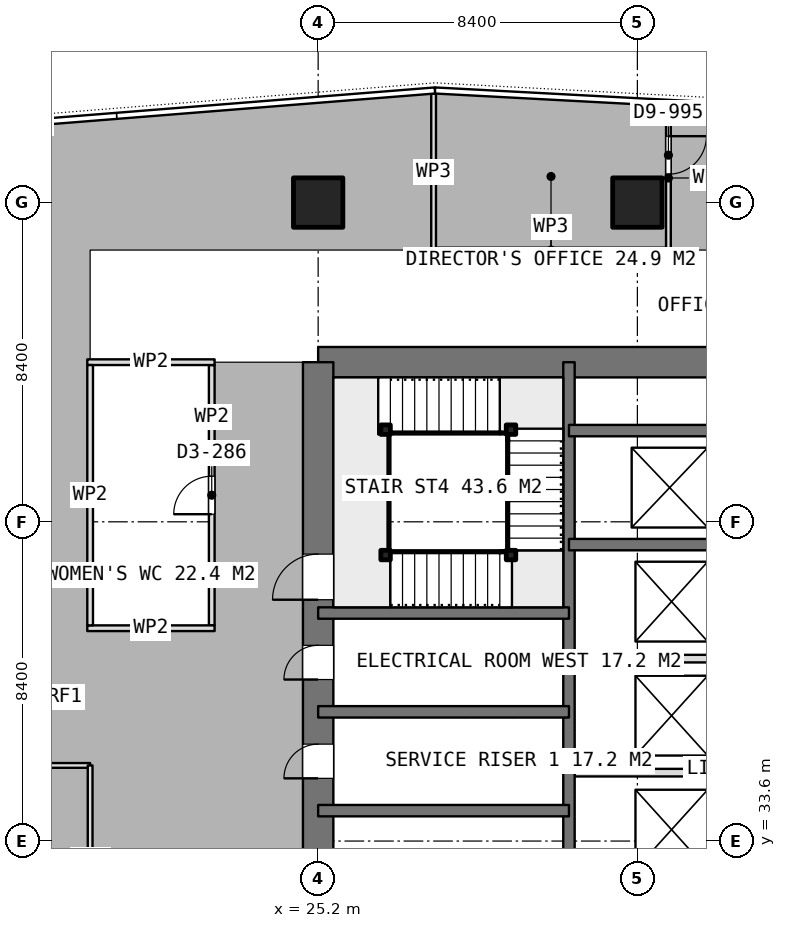
"""IFC4 building model, lengths in metres.
Left out: names, types, materials, properties, quantities, classifications, styles, units other than length and angle.
Written with IfcOpenShell. Run it as: python <this file> out.ifc"""

import sys

from ifc_helpers import new_model, si_unit, direction, frame, frame_2d, origin, origin_2d, place, context, subcontext, project, spatial, rectangle, extrude, element, fill, save


model = new_model("IFC4")
c1 = context("Model", 3, precision=1e-05, world=origin(), true_north=direction((0.0, 1.0)))
c2 = subcontext(c1, "Body", "Model", "MODEL_VIEW")
j1 = project(units=[si_unit("LENGTHUNIT", "METRE"), si_unit("PLANEANGLEUNIT", "RADIAN")], contexts=[c1])
p1 = place(None, origin())
s1 = spatial("IfcSite", under=j1, at=p1, CompositionType="ELEMENT")
p2 = place(p1, origin())
s2 = spatial("IfcBuilding", under=s1, at=p2, CompositionType="ELEMENT")
p3 = place(p2, frame((0.0, 0.0, 265.1)))
s3 = spatial("IfcBuildingStorey", under=s2, at=p3, CompositionType="ELEMENT", Elevation=265.1)
p4 = place(p3, frame((25.2, 46.2, 0.0), z_axis=(0.0, 0.0, 1.0), x_axis=(1.0, 0.0, 0.0)))
e1 = element("IfcWall", 1, at=p4, inside=s3, PredefinedType="SHEAR", context=c2, shape_type="SweptSolid", body=[
    extrude(rectangle(XDim=10.4, YDim=0.8, at=frame_2d((5.2, 0.0))), origin(), (0.0, 0.0, 1.0), 3.75),
])
p5 = place(p3, frame((25.2, 21.0, 0.0), z_axis=(0.0, 0.0, 1.0), x_axis=(0.0, 1.0, 0.0)))
e2 = element("IfcWall", 2, at=p5, inside=s3, PredefinedType="SHEAR", context=c2, shape_type="SweptSolid", body=[
    extrude(rectangle(XDim=25.2, YDim=0.8, at=frame_2d((12.6, 0.0))), origin(), (0.0, 0.0, 1.0), 3.75),
])
p6 = place(p5, frame((7.8, 0.0, 0.0)))
e3 = element("IfcOpeningElement", 3, at=p6, cuts=e2, PredefinedType="OPENING", context=c2, shape_type="SweptSolid", body=[
    extrude(rectangle(XDim=1.2, YDim=2.1, at=frame_2d((0.6, 1.05))), frame((0.0, 0.41, 0.0), z_axis=(0.0, -1.0, 0.0), x_axis=(1.0, 0.0, 0.0)), (0.0, 0.0, 1.0), 0.82),
])
p7 = place(p5, frame((14.25, 0.0, 0.0)))
e4 = element("IfcOpeningElement", 4, at=p7, cuts=e2, PredefinedType="OPENING", context=c2, shape_type="SweptSolid", body=[
    extrude(rectangle(XDim=0.9, YDim=2.1, at=frame_2d((0.45, 1.05))), frame((0.0, 0.41, 0.0), z_axis=(0.0, -1.0, 0.0), x_axis=(1.0, 0.0, 0.0)), (0.0, 0.0, 1.0), 0.82),
])
p8 = place(p5, frame((16.85, 0.0, 0.0)))
e5 = element("IfcOpeningElement", 5, at=p8, cuts=e2, PredefinedType="OPENING", context=c2, shape_type="SweptSolid", body=[
    extrude(rectangle(XDim=0.9, YDim=2.1, at=frame_2d((0.45, 1.05))), frame((0.0, 0.41, 0.0), z_axis=(0.0, -1.0, 0.0), x_axis=(1.0, 0.0, 0.0)), (0.0, 0.0, 1.0), 0.82),
])
p9 = place(p5, frame((18.95, 0.0, 0.0)))
e6 = element("IfcOpeningElement", 6, at=p9, cuts=e2, PredefinedType="OPENING", context=c2, shape_type="SweptSolid", body=[
    extrude(rectangle(XDim=1.2, YDim=2.1, at=frame_2d((0.6, 1.05))), frame((0.0, 0.41, 0.0), z_axis=(0.0, -1.0, 0.0), x_axis=(1.0, 0.0, 0.0)), (0.0, 0.0, 1.0), 0.82),
])
p10 = place(p3, frame((31.8, 21.0, 0.0), z_axis=(0.0, 0.0, 1.0), x_axis=(0.0, 1.0, 0.0)))
e7 = element("IfcWall", 7, at=p10, inside=s3, PredefinedType="SHEAR", context=c2, shape_type="SweptSolid", body=[
    extrude(rectangle(XDim=25.2, YDim=0.3, at=frame_2d((12.6, 0.0))), origin(), (0.0, 0.0, 1.0), 3.75),
])
for number, where, z_axis, x_axis in (
    (8, (31.8, 41.4, 0.0), (0.0, 0.0, 1.0), (1.0, 0.0, 0.0)),
    (9, (31.8, 44.4, 0.0), (0.0, 0.0, 1.0), (1.0, 0.0, 0.0)),
):
    element("IfcWall", number, at=place(p3, frame(where, z_axis=z_axis, x_axis=x_axis)), inside=s3, PredefinedType="SHEAR", context=c2, shape_type="SweptSolid", body=[
        extrude(rectangle(XDim=3.8, YDim=0.3, at=frame_2d((1.9, 0.0))), origin(), (0.0, 0.0, 1.0), 3.75),
    ])
for number, where, z_axis, x_axis in (
    (10, (25.2, 34.4, 0.0), (0.0, 0.0, 1.0), (1.0, 0.0, 0.0)),
    (11, (25.2, 37.0, 0.0), (0.0, 0.0, 1.0), (1.0, 0.0, 0.0)),
    (12, (25.2, 39.6, 0.0), (0.0, 0.0, 1.0), (1.0, 0.0, 0.0)),
):
    element("IfcWall", number, at=place(p3, frame(where, z_axis=z_axis, x_axis=x_axis)), inside=s3, PredefinedType="SHEAR", context=c2, shape_type="SweptSolid", body=[
        extrude(rectangle(XDim=6.6, YDim=0.3, at=frame_2d((3.3, 0.0))), origin(), (0.0, 0.0, 1.0), 3.75),
    ])
for number, where, z_axis, x_axis in (
    (13, (25.2, 50.4, 0.0), (0.0, 0.0, 1.0), (1.0, 0.0, 0.0)),
    (14, (33.6, 50.4, 0.0), (0.0, 0.0, 1.0), (1.0, 0.0, 0.0)),
):
    element("IfcColumn", number, at=place(p3, frame(where, z_axis=z_axis, x_axis=x_axis)), inside=s3, PredefinedType="COLUMN", context=c2, shape_type="SweptSolid", body=[
        extrude(rectangle(XDim=1.3, YDim=1.3, at=origin_2d()), origin(), (0.0, 0.0, 1.0), 3.75),
    ])
for number, where, z_axis, x_axis in (
    (15, (31.95, 35.4, 0.0), (0.0, 0.0, 1.0), (1.0, 0.0, 0.0)),
    (16, (31.95, 38.4, 0.0), (0.0, 0.0, 1.0), (1.0, 0.0, 0.0)),
):
    element("IfcWall", number, at=place(p3, frame(where, z_axis=z_axis, x_axis=x_axis)), inside=s3, PredefinedType="PARTITIONING", context=c2, shape_type="SweptSolid", body=[
        extrude(rectangle(XDim=3.5, YDim=0.2, at=frame_2d((1.75, 0.0))), origin(), (0.0, 0.0, 1.0), 3.5),
    ])
for number, where, z_axis, x_axis in (
    (17, (19.125, 39.2, 0.0), (0.0, 0.0, 1.0), (1.0, 0.0, 0.0)),
    (18, (19.125, 46.2, 0.0), (0.0, 0.0, 1.0), (1.0, 0.0, 0.0)),
):
    element("IfcWall", number, at=place(p3, frame(where, z_axis=z_axis, x_axis=x_axis)), inside=s3, PredefinedType="PARTITIONING", context=c2, shape_type="SweptSolid", body=[
        extrude(rectangle(XDim=3.35, YDim=0.15, at=frame_2d((1.675, 0.0))), origin(), (0.0, 0.0, 1.0), 3.5),
    ])
p11 = place(p3, frame((19.2, 39.275, 0.0), z_axis=(0.0, 0.0, 1.0), x_axis=(0.0, 1.0, 0.0)))
e19 = element("IfcWall", 19, at=p11, inside=s3, PredefinedType="PARTITIONING", context=c2, shape_type="SweptSolid", body=[
    extrude(rectangle(XDim=6.85, YDim=0.15, at=frame_2d((3.425, 0.0))), origin(), (0.0, 0.0, 1.0), 3.5),
])
p12 = place(p3, frame((22.4, 39.275, 0.0), z_axis=(0.0, 0.0, 1.0), x_axis=(0.0, 1.0, 0.0)))
e20 = element("IfcWall", 20, at=p12, inside=s3, PredefinedType="PARTITIONING", context=c2, shape_type="SweptSolid", body=[
    extrude(rectangle(XDim=6.85, YDim=0.15, at=frame_2d((3.425, 0.0))), origin(), (0.0, 0.0, 1.0), 3.5),
])
p13 = place(p12, frame((2.925, 0.0, 0.0)))
e21 = element("IfcOpeningElement", 21, at=p13, cuts=e20, PredefinedType="OPENING", context=c2, shape_type="SweptSolid", body=[
    extrude(rectangle(XDim=1.0, YDim=2.1, at=frame_2d((0.5, 1.05))), frame((0.0, 0.085, 0.0), z_axis=(0.0, -1.0, 0.0), x_axis=(1.0, 0.0, 0.0)), (0.0, 0.0, 1.0), 0.17),
])
p14 = place(p3, frame((34.417, 52.943, 0.0), z_axis=(0.0, 0.0, 1.0), x_axis=(0.0, -1.0, 0.0)))
e22 = element("IfcWall", 22, at=p14, inside=s3, PredefinedType="PARTITIONING", context=c2, shape_type="SweptSolid", body=[
    extrude(rectangle(XDim=3.793, YDim=0.125, at=frame_2d((1.896, 0.0))), origin(), (0.0, 0.0, 1.0), 3.5),
])
p15 = place(p14, frame((0.796, 0.0, 0.0)))
e23 = element("IfcOpeningElement", 23, at=p15, cuts=e22, PredefinedType="OPENING", context=c2, shape_type="SweptSolid", body=[
    extrude(rectangle(XDim=1.0, YDim=2.1, at=frame_2d((0.5, 1.05))), frame((0.0, 0.073, 0.0), z_axis=(0.0, -1.0, 0.0), x_axis=(1.0, 0.0, 0.0)), (0.0, 0.0, 1.0), 0.145),
])
p16 = place(p3, frame((34.417, 49.15, 0.0), z_axis=(0.0, 0.0, 1.0), x_axis=(-1.0, 0.0, 0.0)))
e24 = element("IfcWall", 24, at=p16, inside=s3, PredefinedType="PARTITIONING", context=c2, shape_type="SweptSolid", body=[
    extrude(rectangle(XDim=6.179, YDim=0.125, at=frame_2d((3.089, 0.0))), origin(), (0.0, 0.0, 1.0), 3.5),
])
p17 = place(p3, frame((28.238, 49.15, 0.0), z_axis=(0.0, 0.0, 1.0), x_axis=(0.0, 1.0, 0.0)))
e25 = element("IfcWall", 25, at=p17, inside=s3, PredefinedType="PARTITIONING", context=c2, shape_type="SweptSolid", body=[
    extrude(rectangle(XDim=4.117, YDim=0.125, at=frame_2d((2.059, 0.0))), origin(), (0.0, 0.0, 1.0), 3.5),
])
p18 = place(p3, frame((11.707, 35.59, 0.0), z_axis=(0.0, 0.0, 1.0), x_axis=(1.0, 0.0, 0.0)))
e26 = element("IfcWall", 26, at=p18, inside=s3, PredefinedType="PARTITIONING", context=c2, shape_type="SweptSolid", body=[
    extrude(rectangle(XDim=7.493, YDim=0.125, at=frame_2d((3.747, 0.0))), origin(), (0.0, 0.0, 1.0), 3.5),
])
p19 = place(p18, frame((2.846, 0.0, 0.0)))
e27 = element("IfcOpeningElement", 27, at=p19, cuts=e26, PredefinedType="OPENING", context=c2, shape_type="SweptSolid", body=[
    extrude(rectangle(XDim=1.8, YDim=2.1, at=frame_2d((0.9, 1.05))), frame((0.0, 0.073, 0.0), z_axis=(0.0, -1.0, 0.0), x_axis=(1.0, 0.0, 0.0)), (0.0, 0.0, 1.0), 0.145),
])
p20 = place(p3, frame((19.2, 35.59, 0.0), z_axis=(0.0, 0.0, 1.0), x_axis=(0.0, -1.0, 0.0)))
e28 = element("IfcWall", 28, at=p20, inside=s3, PredefinedType="PARTITIONING", context=c2, shape_type="SweptSolid", body=[
    extrude(rectangle(XDim=7.099, YDim=0.125, at=frame_2d((3.55, 0.0))), origin(), (0.0, 0.0, 1.0), 3.5),
])
for number, where, z_axis, x_axis in (
    (29, (26.975, 41.125, 0.0), (0.0, 0.0, 1.0), (1.0, 0.0, 0.0)),
    (30, (30.275, 41.125, 0.0), (0.0, 0.0, 1.0), (1.0, 0.0, 0.0)),
    (31, (30.275, 44.425, 0.0), (0.0, 0.0, 1.0), (1.0, 0.0, 0.0)),
    (32, (26.975, 44.425, 0.0), (0.0, 0.0, 1.0), (1.0, 0.0, 0.0)),
):
    element("IfcColumn", number, at=place(p3, frame(where, z_axis=z_axis, x_axis=x_axis)), inside=s3, PredefinedType="COLUMN", context=c2, shape_type="SweptSolid", body=[
        extrude(rectangle(XDim=0.25, YDim=0.25, at=origin_2d()), origin(), (0.0, 0.0, 1.0), 3.75),
    ])
p21 = place(p7, origin())
e33 = element("IfcDoor", 33, at=p21, inside=s3, OperationType="SINGLE_SWING_LEFT", PredefinedType="DOOR", context=c2, shape_type="SweptSolid", body=[
    extrude(rectangle(XDim=0.9, YDim=2.1, at=frame_2d((0.45, 1.05))), frame((0.0, 0.025, 0.0), z_axis=(0.0, -1.0, 0.0), x_axis=(1.0, 0.0, 0.0)), (0.0, 0.0, 1.0), 0.05),
])
fill(e4, e33)
p22 = place(p8, origin())
e34 = element("IfcDoor", 34, at=p22, inside=s3, OperationType="SINGLE_SWING_LEFT", PredefinedType="DOOR", context=c2, shape_type="SweptSolid", body=[
    extrude(rectangle(XDim=0.9, YDim=2.1, at=frame_2d((0.45, 1.05))), frame((0.0, 0.025, 0.0), z_axis=(0.0, -1.0, 0.0), x_axis=(1.0, 0.0, 0.0)), (0.0, 0.0, 1.0), 0.05),
])
fill(e5, e34)
p23 = place(p13, origin())
e35 = element("IfcDoor", 35, at=p23, inside=s3, OperationType="SINGLE_SWING_LEFT", PredefinedType="DOOR", context=c2, shape_type="SweptSolid", body=[
    extrude(rectangle(XDim=1.0, YDim=2.1, at=frame_2d((0.5, 1.05))), frame((0.0, 0.025, 0.0), z_axis=(0.0, -1.0, 0.0), x_axis=(1.0, 0.0, 0.0)), (0.0, 0.0, 1.0), 0.05),
])
fill(e21, e35)
p24 = place(p15, origin())
e36 = element("IfcDoor", 36, at=p24, inside=s3, OperationType="SINGLE_SWING_LEFT", PredefinedType="DOOR", context=c2, shape_type="SweptSolid", body=[
    extrude(rectangle(XDim=1.0, YDim=2.1, at=frame_2d((0.5, 1.05))), frame((0.0, 0.025, 0.0), z_axis=(0.0, -1.0, 0.0), x_axis=(1.0, 0.0, 0.0)), (0.0, 0.0, 1.0), 0.05),
])
fill(e23, e36)
p25 = place(p9, origin())
e37 = element("IfcDoor", 37, at=p25, inside=s3, OperationType="SINGLE_SWING_RIGHT", PredefinedType="DOOR", context=c2, shape_type="SweptSolid", body=[
    extrude(rectangle(XDim=1.2, YDim=2.1, at=frame_2d((0.6, 1.05))), frame((0.0, 0.025, 0.0), z_axis=(0.0, -1.0, 0.0), x_axis=(1.0, 0.0, 0.0)), (0.0, 0.0, 1.0), 0.05),
])
fill(e6, e37)
save(model, sys.argv[1])
